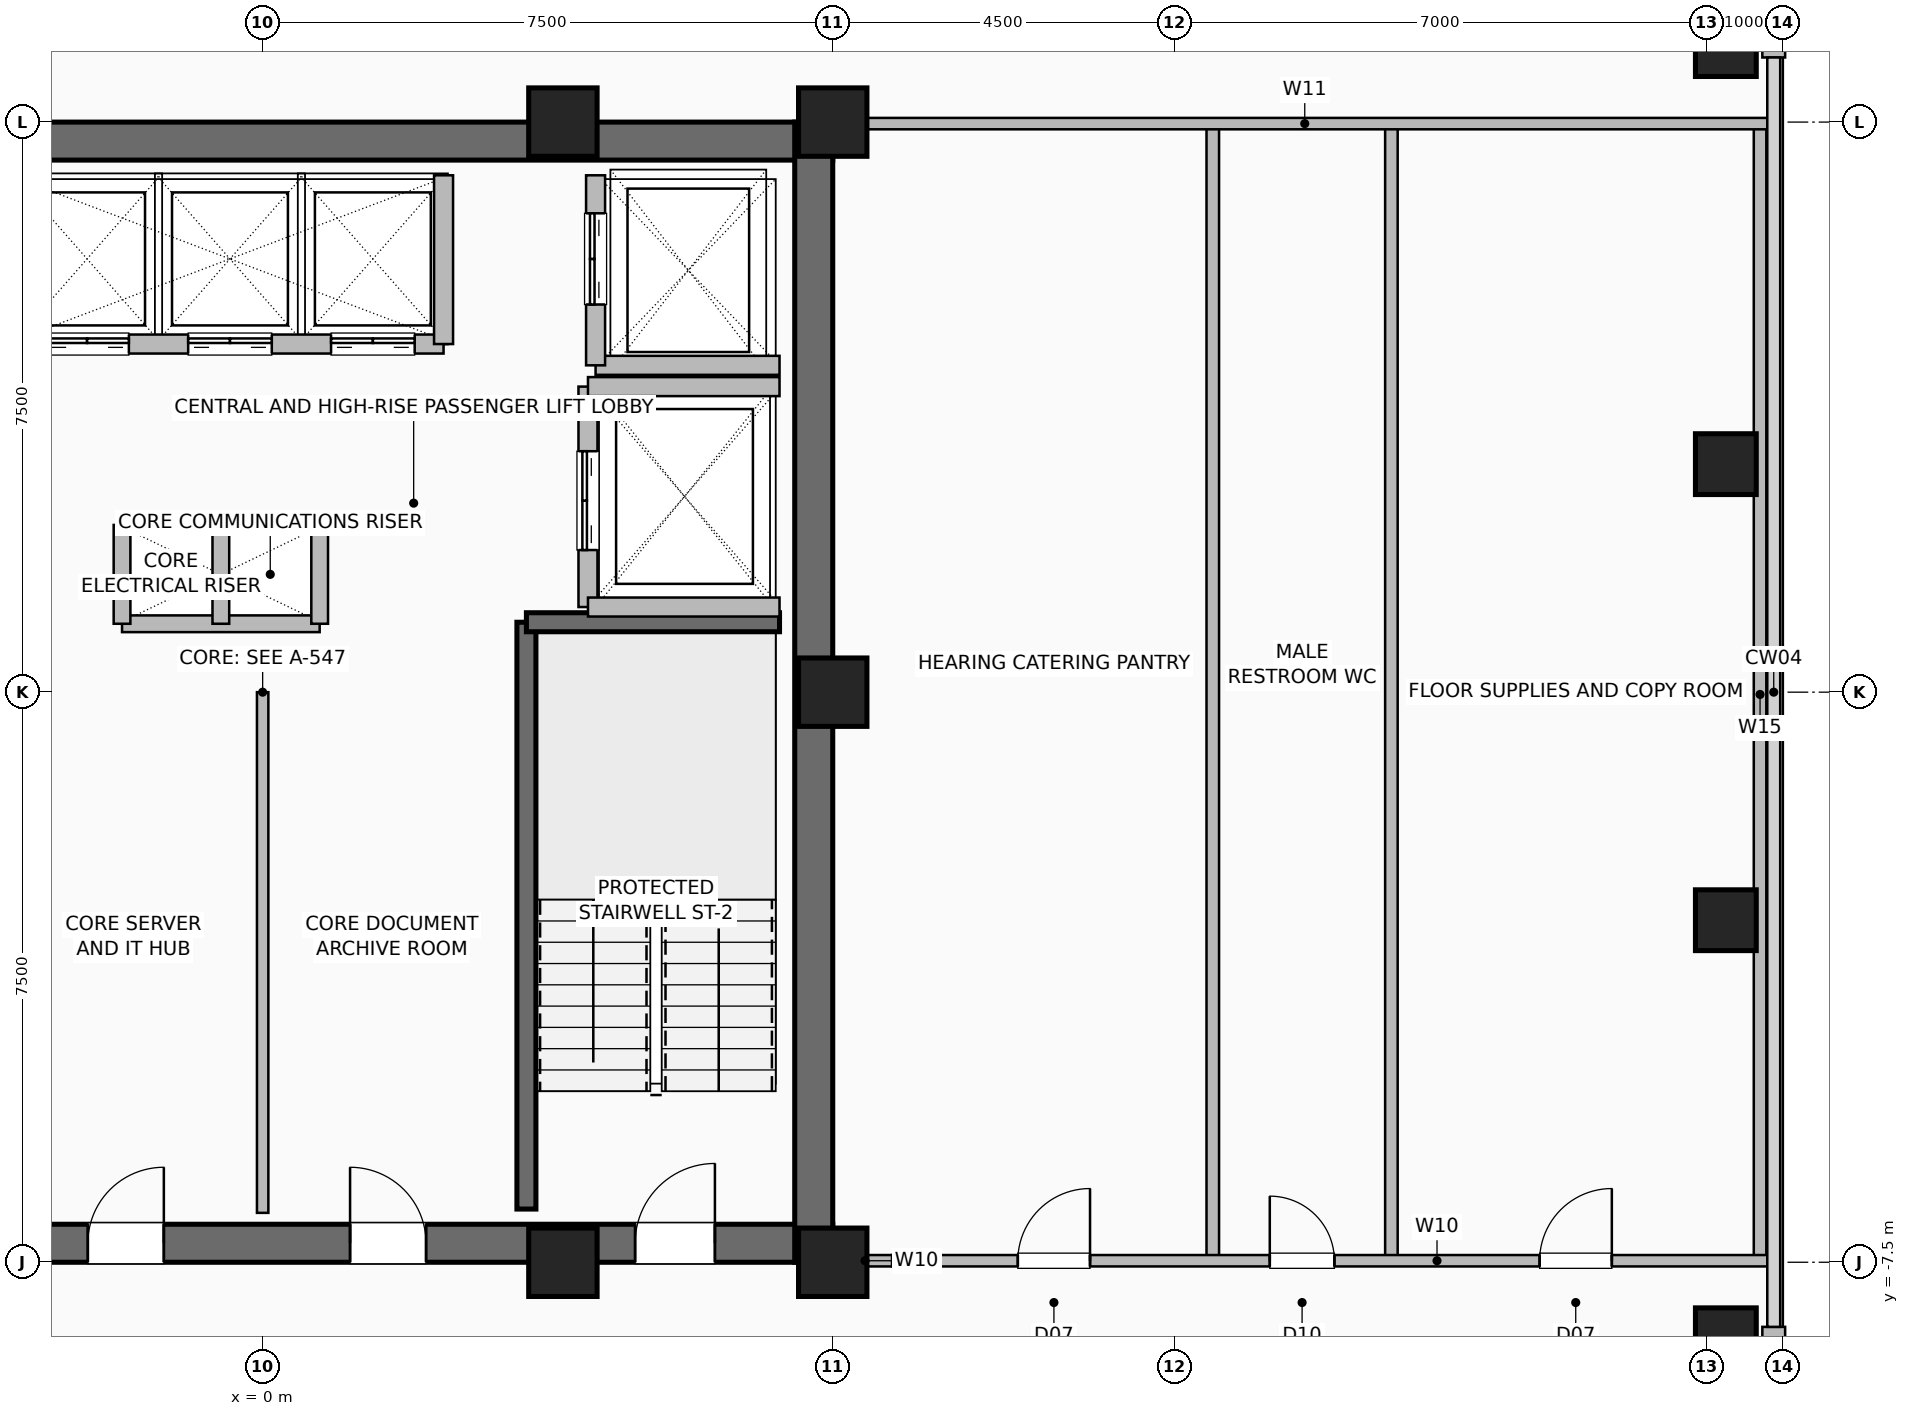
"""IFC4 building model, lengths in metres.
Left out: names, types, materials, properties, quantities, classifications, styles, units other than length and angle.
Written with IfcOpenShell. Run it as: python <this file> out.ifc"""

import sys

from ifc_helpers import new_model, si_unit, direction, frame, frame_2d, origin, origin_2d, place, context, subcontext, project, spatial, rectangle, hollow_rectangle, extrude, element, fill, save


model = new_model("IFC4")
c1 = context("Model", 3, precision=1e-05, world=origin(), true_north=direction((0.0, 1.0)))
c2 = subcontext(c1, "Body", "Model", "MODEL_VIEW")
j1 = project(units=[si_unit("LENGTHUNIT", "METRE"), si_unit("PLANEANGLEUNIT", "RADIAN")], contexts=[c1])
p1 = place(None, origin())
s1 = spatial("IfcSite", under=j1, at=p1, CompositionType="ELEMENT")
p2 = place(p1, origin())
s2 = spatial("IfcBuilding", under=s1, at=p2, CompositionType="ELEMENT")
p3 = place(p2, frame((0.0, 0.0, 180.6)))
s3 = spatial("IfcBuildingStorey", under=s2, at=p3, CompositionType="ELEMENT", Elevation=180.6)
for number, where, z_axis, x_axis in (
    (1, (3.95, -7.5, 0.0), (0.0, 0.0, 1.0), (1.0, 0.0, 0.0)),
    (2, (7.5, -7.5, 0.0), (0.0, 0.0, 1.0), (1.0, 0.0, 0.0)),
    (3, (7.5, 0.0, 0.0), (0.0, 0.0, 1.0), (1.0, 0.0, 0.0)),
    (4, (7.5, 7.5, 0.0), (0.0, 0.0, 1.0), (1.0, 0.0, 0.0)),
    (5, (3.95, 7.5, 0.0), (0.0, 0.0, 1.0), (1.0, 0.0, 0.0)),
):
    element("IfcColumn", number, at=place(p3, frame(where, z_axis=z_axis, x_axis=x_axis)), inside=s3, PredefinedType="COLUMN", context=c2, shape_type="SweptSolid", body=[
        extrude(hollow_rectangle(XDim=0.9, YDim=0.9, WallThickness=0.045, at=origin_2d()), origin(), (0.0, 0.0, 1.0), 3.6),
    ])
for number, where, z_axis, x_axis in (
    (6, (19.25, -8.5, 0.0), (0.0, 0.0, 1.0), (1.0, 0.0, 0.0)),
    (7, (19.25, -3.0, 0.0), (0.0, 0.0, 1.0), (1.0, 0.0, 0.0)),
    (8, (19.25, 3.0, 0.0), (0.0, 0.0, 1.0), (1.0, 0.0, 0.0)),
    (9, (19.25, 8.5, 0.0), (0.0, 0.0, 1.0), (1.0, 0.0, 0.0)),
):
    element("IfcColumn", number, at=place(p3, frame(where, z_axis=z_axis, x_axis=x_axis)), inside=s3, PredefinedType="COLUMN", context=c2, shape_type="SweptSolid", body=[
        extrude(hollow_rectangle(XDim=0.8, YDim=0.8, WallThickness=0.04, at=origin_2d()), origin(), (0.0, 0.0, 1.0), 3.6),
    ])
for number, where, z_axis, x_axis in (
    (10, (19.88, -13.15, 0.0), (0.0, 0.0, 1.0), (0.0, 1.0, 0.0)),
    (11, (19.88, 8.35, 0.0), (0.0, 0.0, 1.0), (0.0, 1.0, 0.0)),
):
    element("IfcWall", number, at=place(p3, frame(where, z_axis=z_axis, x_axis=x_axis)), inside=s3, PredefinedType="SOLIDWALL", context=c2, shape_type="SweptSolid", body=[
        extrude(rectangle(XDim=4.8, YDim=0.3, at=frame_2d((2.4, 0.0))), origin(), (0.0, 0.0, 1.0), 3.36),
    ])
p4 = place(p3, frame((-7.5, -7.25, 0.0), z_axis=(0.0, 0.0, 1.0), x_axis=(1.0, 0.0, 0.0)))
e12 = element("IfcWall", 12, at=p4, inside=s3, PredefinedType="SHEAR", context=c2, shape_type="SweptSolid", body=[
    extrude(rectangle(XDim=15.0, YDim=0.5, at=frame_2d((7.5, 0.0))), origin(), (0.0, 0.0, 1.0), 3.36),
])
p5 = place(p4, frame((1.55, 0.0, 0.0)))
e13 = element("IfcOpeningElement", 13, at=p5, cuts=e12, PredefinedType="OPENING", context=c2, shape_type="SweptSolid", body=[
    extrude(rectangle(XDim=1.05, YDim=2.08, at=frame_2d((0.525, 1.04))), frame((0.0, 0.26, 0.0), z_axis=(0.0, -1.0, 0.0), x_axis=(1.0, 0.0, 0.0)), (0.0, 0.0, 1.0), 0.52),
])
p6 = place(p4, frame((12.4, 0.0, 0.0)))
e14 = element("IfcOpeningElement", 14, at=p6, cuts=e12, PredefinedType="OPENING", context=c2, shape_type="SweptSolid", body=[
    extrude(rectangle(XDim=1.05, YDim=2.08, at=frame_2d((0.525, 1.04))), frame((0.0, 0.26, 0.0), z_axis=(0.0, -1.0, 0.0), x_axis=(1.0, 0.0, 0.0)), (0.0, 0.0, 1.0), 0.52),
])
p7 = place(p4, frame((5.2, 0.0, 0.0)))
e15 = element("IfcOpeningElement", 15, at=p7, cuts=e12, PredefinedType="OPENING", context=c2, shape_type="SweptSolid", body=[
    extrude(rectangle(XDim=1.0, YDim=2.08, at=frame_2d((0.5, 1.04))), frame((0.0, 0.26, 0.0), z_axis=(0.0, -1.0, 0.0), x_axis=(1.0, 0.0, 0.0)), (0.0, 0.0, 1.0), 0.52),
])
p8 = place(p4, frame((8.65, 0.0, 0.0)))
e16 = element("IfcOpeningElement", 16, at=p8, cuts=e12, PredefinedType="OPENING", context=c2, shape_type="SweptSolid", body=[
    extrude(rectangle(XDim=1.0, YDim=2.08, at=frame_2d((0.5, 1.04))), frame((0.0, 0.26, 0.0), z_axis=(0.0, -1.0, 0.0), x_axis=(1.0, 0.0, 0.0)), (0.0, 0.0, 1.0), 0.52),
])
for number, where, z_axis, x_axis in (
    (17, (-7.5, 7.25, 0.0), (0.0, 0.0, 1.0), (1.0, 0.0, 0.0)),
    (18, (7.25, -7.5, 0.0), (0.0, 0.0, 1.0), (0.0, 1.0, 0.0)),
):
    element("IfcWall", number, at=place(p3, frame(where, z_axis=z_axis, x_axis=x_axis)), inside=s3, PredefinedType="SHEAR", context=c2, shape_type="SweptSolid", body=[
        extrude(rectangle(XDim=15.0, YDim=0.5, at=frame_2d((7.5, 0.0))), origin(), (0.0, 0.0, 1.0), 3.36),
    ])
p9 = place(p3, frame((3.47, -6.8, 0.0), z_axis=(0.0, 0.0, 1.0), x_axis=(0.0, 1.0, 0.0)))
e19 = element("IfcWall", 19, at=p9, inside=s3, PredefinedType="SHEAR", context=c2, shape_type="SweptSolid", body=[
    extrude(rectangle(XDim=7.72, YDim=0.25, at=frame_2d((3.86, 0.0))), origin(), (0.0, 0.0, 1.0), 3.36),
])
p10 = place(p3, frame((3.47, 0.92, 0.0), z_axis=(0.0, 0.0, 1.0), x_axis=(1.0, 0.0, 0.0)))
e20 = element("IfcWall", 20, at=p10, inside=s3, PredefinedType="SHEAR", context=c2, shape_type="SweptSolid", body=[
    extrude(rectangle(XDim=3.33, YDim=0.25, at=frame_2d((1.665, 0.0))), origin(), (0.0, 0.0, 1.0), 3.36),
])
for number, where, z_axis, x_axis in (
    (21, (-1.85, 2.2, 0.0), (0.0, 0.0, 1.0), (1.0, 0.0, 0.0)),
    (22, (-1.85, 0.9, 0.0), (0.0, 0.0, 1.0), (1.0, 0.0, 0.0)),
):
    element("IfcWall", number, at=place(p3, frame(where, z_axis=z_axis, x_axis=x_axis)), inside=s3, PredefinedType="PARTITIONING", context=c2, shape_type="SweptSolid", body=[
        extrude(rectangle(XDim=2.6, YDim=0.22, at=frame_2d((1.3, 0.0))), origin(), (0.0, 0.0, 1.0), 3.36),
    ])
for number, where, z_axis, x_axis in (
    (23, (-0.55, 0.9, 0.0), (0.0, 0.0, 1.0), (0.0, 1.0, 0.0)),
    (24, (0.75, 0.9, 0.0), (0.0, 0.0, 1.0), (0.0, 1.0, 0.0)),
    (25, (-1.85, 0.9, 0.0), (0.0, 0.0, 1.0), (0.0, 1.0, 0.0)),
):
    element("IfcWall", number, at=place(p3, frame(where, z_axis=z_axis, x_axis=x_axis)), inside=s3, PredefinedType="PARTITIONING", context=c2, shape_type="SweptSolid", body=[
        extrude(rectangle(XDim=1.3, YDim=0.22, at=frame_2d((0.65, 0.0))), origin(), (0.0, 0.0, 1.0), 3.36),
    ])
p11 = place(p3, frame((-3.26, 4.58, 0.0), z_axis=(0.0, 0.0, 1.0), x_axis=(1.0, 0.0, 0.0)))
e26 = element("IfcWall", 26, at=p11, inside=s3, PredefinedType="SHEAR", context=c2, shape_type="SweptSolid", body=[
    extrude(rectangle(XDim=5.64, YDim=0.25, at=frame_2d((2.82, 0.0))), origin(), (0.0, 0.0, 1.0), 3.36),
])
p12 = place(p11, frame((0.4, 0.0, 0.0)))
e27 = element("IfcOpeningElement", 27, at=p12, cuts=e26, PredefinedType="OPENING", context=c2, shape_type="SweptSolid", body=[
    extrude(rectangle(XDim=1.1, YDim=2.2, at=frame_2d((0.55, 1.1))), frame((0.0, 0.135, 0.0), z_axis=(0.0, -1.0, 0.0), x_axis=(1.0, 0.0, 0.0)), (0.0, 0.0, 1.0), 0.27),
])
p13 = place(p11, frame((2.28, 0.0, 0.0)))
e28 = element("IfcOpeningElement", 28, at=p13, cuts=e26, PredefinedType="OPENING", context=c2, shape_type="SweptSolid", body=[
    extrude(rectangle(XDim=1.1, YDim=2.2, at=frame_2d((0.55, 1.1))), frame((0.0, 0.135, 0.0), z_axis=(0.0, -1.0, 0.0), x_axis=(1.0, 0.0, 0.0)), (0.0, 0.0, 1.0), 0.27),
])
p14 = place(p11, frame((4.16, 0.0, 0.0)))
e29 = element("IfcOpeningElement", 29, at=p14, cuts=e26, PredefinedType="OPENING", context=c2, shape_type="SweptSolid", body=[
    extrude(rectangle(XDim=1.1, YDim=2.2, at=frame_2d((0.55, 1.1))), frame((0.0, 0.135, 0.0), z_axis=(0.0, -1.0, 0.0), x_axis=(1.0, 0.0, 0.0)), (0.0, 0.0, 1.0), 0.27),
])
p15 = place(p3, frame((2.38, 4.58, 0.0), z_axis=(0.0, 0.0, 1.0), x_axis=(0.0, 1.0, 0.0)))
e30 = element("IfcWall", 30, at=p15, inside=s3, PredefinedType="SHEAR", context=c2, shape_type="SweptSolid", body=[
    extrude(rectangle(XDim=2.22, YDim=0.25, at=frame_2d((1.11, 0.0))), origin(), (0.0, 0.0, 1.0), 3.36),
])
p16 = place(p3, frame((4.38, 4.3, 0.0), z_axis=(0.0, 0.0, 1.0), x_axis=(1.0, 0.0, 0.0)))
e31 = element("IfcWall", 31, at=p16, inside=s3, PredefinedType="SHEAR", context=c2, shape_type="SweptSolid", body=[
    extrude(rectangle(XDim=2.42, YDim=0.25, at=frame_2d((1.21, 0.0))), origin(), (0.0, 0.0, 1.0), 3.36),
])
p17 = place(p3, frame((4.38, 4.3, 0.0), z_axis=(0.0, 0.0, 1.0), x_axis=(0.0, 1.0, 0.0)))
e32 = element("IfcWall", 32, at=p17, inside=s3, PredefinedType="SHEAR", context=c2, shape_type="SweptSolid", body=[
    extrude(rectangle(XDim=2.5, YDim=0.25, at=frame_2d((1.25, 0.0))), origin(), (0.0, 0.0, 1.0), 3.36),
])
p18 = place(p17, frame((0.8, 0.0, 0.0)))
e33 = element("IfcOpeningElement", 33, at=p18, cuts=e32, PredefinedType="OPENING", context=c2, shape_type="SweptSolid", body=[
    extrude(rectangle(XDim=1.2, YDim=2.2, at=frame_2d((0.6, 1.1))), frame((0.0, 0.135, 0.0), z_axis=(0.0, -1.0, 0.0), x_axis=(1.0, 0.0, 0.0)), (0.0, 0.0, 1.0), 0.27),
])
p19 = place(p3, frame((4.28, 1.12, 0.0), z_axis=(0.0, 0.0, 1.0), x_axis=(0.0, 1.0, 0.0)))
e34 = element("IfcWall", 34, at=p19, inside=s3, PredefinedType="SHEAR", context=c2, shape_type="SweptSolid", body=[
    extrude(rectangle(XDim=2.9, YDim=0.25, at=frame_2d((1.45, 0.0))), origin(), (0.0, 0.0, 1.0), 3.36),
])
p20 = place(p19, frame((0.75, 0.0, 0.0)))
e35 = element("IfcOpeningElement", 35, at=p20, cuts=e34, PredefinedType="OPENING", context=c2, shape_type="SweptSolid", body=[
    extrude(rectangle(XDim=1.3, YDim=2.3, at=frame_2d((0.65, 1.15))), frame((0.0, 0.135, 0.0), z_axis=(0.0, -1.0, 0.0), x_axis=(1.0, 0.0, 0.0)), (0.0, 0.0, 1.0), 0.27),
])
for number, where, z_axis, x_axis in (
    (36, (4.28, 1.12, 0.0), (0.0, 0.0, 1.0), (1.0, 0.0, 0.0)),
    (37, (4.28, 4.02, 0.0), (0.0, 0.0, 1.0), (1.0, 0.0, 0.0)),
):
    element("IfcWall", number, at=place(p3, frame(where, z_axis=z_axis, x_axis=x_axis)), inside=s3, PredefinedType="SHEAR", context=c2, shape_type="SweptSolid", body=[
        extrude(rectangle(XDim=2.52, YDim=0.25, at=frame_2d((1.26, 0.0))), origin(), (0.0, 0.0, 1.0), 3.36),
    ])
p21 = place(p3, frame((0.0, -6.85, 0.0), z_axis=(0.0, 0.0, 1.0), x_axis=(0.0, 1.0, 0.0)))
e38 = element("IfcWall", 38, at=p21, inside=s3, PredefinedType="PARTITIONING", context=c2, shape_type="SweptSolid", body=[
    extrude(rectangle(XDim=6.85, YDim=0.15, at=frame_2d((3.425, 0.0))), origin(), (0.0, 0.0, 1.0), 3.36),
])
p22 = place(p3, frame((7.45, -7.48, 0.0), z_axis=(0.0, 0.0, 1.0), x_axis=(1.0, 0.0, 0.0)))
e39 = element("IfcWall", 39, at=p22, inside=s3, PredefinedType="PARTITIONING", context=c2, shape_type="SweptSolid", body=[
    extrude(rectangle(XDim=0.95, YDim=0.15, at=frame_2d((0.475, 0.0))), origin(), (0.0, 0.0, 1.0), 3.36),
])
for number, where, z_axis, x_axis in (
    (40, (14.85, -7.48, 0.0), (0.0, 0.0, 1.0), (0.0, 1.0, 0.0)),
    (41, (12.5, -7.48, 0.0), (0.0, 0.0, 1.0), (0.0, 1.0, 0.0)),
    (42, (19.7, -7.48, 0.0), (0.0, 0.0, 1.0), (0.0, 1.0, 0.0)),
):
    element("IfcWall", number, at=place(p3, frame(where, z_axis=z_axis, x_axis=x_axis)), inside=s3, PredefinedType="PLUMBINGWALL", context=c2, shape_type="SweptSolid", body=[
        extrude(rectangle(XDim=14.9, YDim=0.165, at=frame_2d((7.45, 0.0))), origin(), (0.0, 0.0, 1.0), 3.36),
    ])
p23 = place(p3, frame((8.28, -7.48, 0.0), z_axis=(0.0, 0.0, 1.0), x_axis=(1.0, 0.0, 0.0)))
e43 = element("IfcWall", 43, at=p23, inside=s3, PredefinedType="PARTITIONING", context=c2, shape_type="SweptSolid", body=[
    extrude(rectangle(XDim=11.54, YDim=0.15, at=frame_2d((5.77, 0.0))), origin(), (0.0, 0.0, 1.0), 3.36),
])
p24 = place(p23, frame((1.655, 0.0, 0.0)))
e44 = element("IfcOpeningElement", 44, at=p24, cuts=e43, PredefinedType="OPENING", context=c2, shape_type="SweptSolid", body=[
    extrude(rectangle(XDim=0.95, YDim=2.06, at=frame_2d((0.475, 1.03))), frame((0.0, 0.085, 0.0), z_axis=(0.0, -1.0, 0.0), x_axis=(1.0, 0.0, 0.0)), (0.0, 0.0, 1.0), 0.17),
])
p25 = place(p23, frame((4.97, 0.0, 0.0)))
e45 = element("IfcOpeningElement", 45, at=p25, cuts=e43, PredefinedType="OPENING", context=c2, shape_type="SweptSolid", body=[
    extrude(rectangle(XDim=0.85, YDim=2.05, at=frame_2d((0.425, 1.025))), frame((0.0, 0.085, 0.0), z_axis=(0.0, -1.0, 0.0), x_axis=(1.0, 0.0, 0.0)), (0.0, 0.0, 1.0), 0.17),
])
p26 = place(p23, frame((8.52, 0.0, 0.0)))
e46 = element("IfcOpeningElement", 46, at=p26, cuts=e43, PredefinedType="OPENING", context=c2, shape_type="SweptSolid", body=[
    extrude(rectangle(XDim=0.95, YDim=2.06, at=frame_2d((0.475, 1.03))), frame((0.0, 0.085, 0.0), z_axis=(0.0, -1.0, 0.0), x_axis=(1.0, 0.0, 0.0)), (0.0, 0.0, 1.0), 0.17),
])
p27 = place(p3, frame((7.6, 7.48, 0.0), z_axis=(0.0, 0.0, 1.0), x_axis=(1.0, 0.0, 0.0)))
e47 = element("IfcWall", 47, at=p27, inside=s3, PredefinedType="PARTITIONING", context=c2, shape_type="SweptSolid", body=[
    extrude(rectangle(XDim=12.22, YDim=0.15, at=frame_2d((6.11, 0.0))), origin(), (0.0, 0.0, 1.0), 3.36),
])
p28 = place(p6, origin())
e48 = element("IfcDoor", 48, at=p28, inside=s3, OperationType="SINGLE_SWING_RIGHT", PredefinedType="DOOR", context=c2, shape_type="SweptSolid", body=[
    extrude(rectangle(XDim=1.05, YDim=2.08, at=frame_2d((0.525, 1.04))), frame((0.0, 0.025, 0.0), z_axis=(0.0, -1.0, 0.0), x_axis=(1.0, 0.0, 0.0)), (0.0, 0.0, 1.0), 0.05),
])
fill(e14, e48)
p29 = place(p7, origin())
e49 = element("IfcDoor", 49, at=p29, inside=s3, OperationType="SINGLE_SWING_RIGHT", PredefinedType="DOOR", context=c2, shape_type="SweptSolid", body=[
    extrude(rectangle(XDim=1.0, YDim=2.08, at=frame_2d((0.5, 1.04))), frame((0.0, 0.025, 0.0), z_axis=(0.0, -1.0, 0.0), x_axis=(1.0, 0.0, 0.0)), (0.0, 0.0, 1.0), 0.05),
])
fill(e15, e49)
p30 = place(p8, origin())
e50 = element("IfcDoor", 50, at=p30, inside=s3, OperationType="SINGLE_SWING_LEFT", PredefinedType="DOOR", context=c2, shape_type="SweptSolid", body=[
    extrude(rectangle(XDim=1.0, YDim=2.08, at=frame_2d((0.5, 1.04))), frame((0.0, 0.025, 0.0), z_axis=(0.0, -1.0, 0.0), x_axis=(1.0, 0.0, 0.0)), (0.0, 0.0, 1.0), 0.05),
])
fill(e16, e50)
p31 = place(p12, origin())
e51 = element("IfcDoor", 51, at=p31, inside=s3, OperationType="DOUBLE_DOOR_SLIDING", PredefinedType="DOOR", context=c2, shape_type="SweptSolid", body=[
    extrude(rectangle(XDim=1.1, YDim=2.2, at=frame_2d((0.55, 1.1))), frame((0.0, 0.025, 0.0), z_axis=(0.0, -1.0, 0.0), x_axis=(1.0, 0.0, 0.0)), (0.0, 0.0, 1.0), 0.05),
])
fill(e27, e51)
p32 = place(p13, origin())
e52 = element("IfcDoor", 52, at=p32, inside=s3, OperationType="DOUBLE_DOOR_SLIDING", PredefinedType="DOOR", context=c2, shape_type="SweptSolid", body=[
    extrude(rectangle(XDim=1.1, YDim=2.2, at=frame_2d((0.55, 1.1))), frame((0.0, 0.025, 0.0), z_axis=(0.0, -1.0, 0.0), x_axis=(1.0, 0.0, 0.0)), (0.0, 0.0, 1.0), 0.05),
])
fill(e28, e52)
p33 = place(p14, origin())
e53 = element("IfcDoor", 53, at=p33, inside=s3, OperationType="DOUBLE_DOOR_SLIDING", PredefinedType="DOOR", context=c2, shape_type="SweptSolid", body=[
    extrude(rectangle(XDim=1.1, YDim=2.2, at=frame_2d((0.55, 1.1))), frame((0.0, 0.025, 0.0), z_axis=(0.0, -1.0, 0.0), x_axis=(1.0, 0.0, 0.0)), (0.0, 0.0, 1.0), 0.05),
])
fill(e29, e53)
p34 = place(p18, origin())
e54 = element("IfcDoor", 54, at=p34, inside=s3, OperationType="DOUBLE_DOOR_SLIDING", PredefinedType="DOOR", context=c2, shape_type="SweptSolid", body=[
    extrude(rectangle(XDim=1.2, YDim=2.2, at=frame_2d((0.6, 1.1))), frame((0.0, 0.025, 0.0), z_axis=(0.0, -1.0, 0.0), x_axis=(1.0, 0.0, 0.0)), (0.0, 0.0, 1.0), 0.05),
])
fill(e33, e54)
p35 = place(p20, origin())
e55 = element("IfcDoor", 55, at=p35, inside=s3, OperationType="DOUBLE_DOOR_SLIDING", PredefinedType="DOOR", context=c2, shape_type="SweptSolid", body=[
    extrude(rectangle(XDim=1.3, YDim=2.3, at=frame_2d((0.65, 1.15))), frame((0.0, 0.025, 0.0), z_axis=(0.0, -1.0, 0.0), x_axis=(1.0, 0.0, 0.0)), (0.0, 0.0, 1.0), 0.05),
])
fill(e35, e55)
p36 = place(p24, origin())
e56 = element("IfcDoor", 56, at=p36, inside=s3, OperationType="SINGLE_SWING_RIGHT", PredefinedType="DOOR", context=c2, shape_type="SweptSolid", body=[
    extrude(rectangle(XDim=0.95, YDim=2.06, at=frame_2d((0.475, 1.03))), frame((0.0, 0.025, 0.0), z_axis=(0.0, -1.0, 0.0), x_axis=(1.0, 0.0, 0.0)), (0.0, 0.0, 1.0), 0.05),
])
fill(e44, e56)
p37 = place(p25, origin())
e57 = element("IfcDoor", 57, at=p37, inside=s3, OperationType="SINGLE_SWING_LEFT", PredefinedType="DOOR", context=c2, shape_type="SweptSolid", body=[
    extrude(rectangle(XDim=0.85, YDim=2.05, at=frame_2d((0.425, 1.025))), frame((0.0, 0.025, 0.0), z_axis=(0.0, -1.0, 0.0), x_axis=(1.0, 0.0, 0.0)), (0.0, 0.0, 1.0), 0.05),
])
fill(e45, e57)
p38 = place(p26, origin())
e58 = element("IfcDoor", 58, at=p38, inside=s3, OperationType="SINGLE_SWING_RIGHT", PredefinedType="DOOR", context=c2, shape_type="SweptSolid", body=[
    extrude(rectangle(XDim=0.95, YDim=2.06, at=frame_2d((0.475, 1.03))), frame((0.0, 0.025, 0.0), z_axis=(0.0, -1.0, 0.0), x_axis=(1.0, 0.0, 0.0)), (0.0, 0.0, 1.0), 0.05),
])
fill(e46, e58)
save(model, sys.argv[1])
